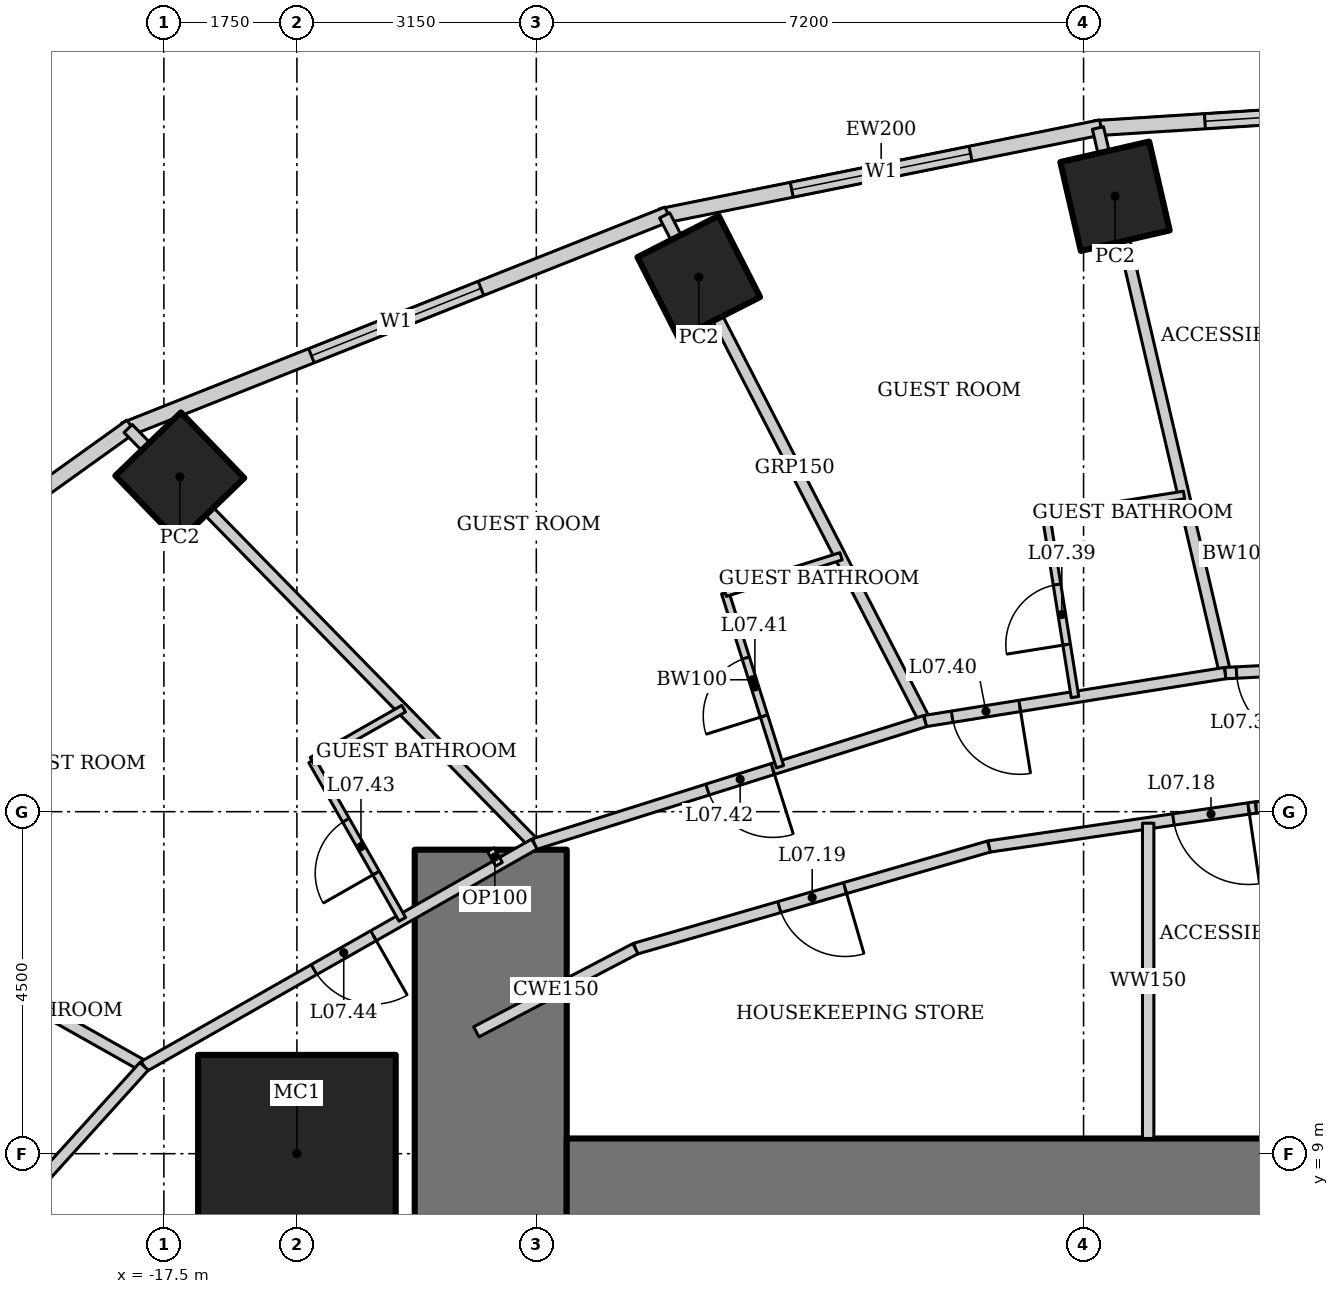
"""IFC4 building model, lengths in metres.
Left out: names, types, materials, properties, quantities, classifications, styles, units other than length and angle.
Written with IfcOpenShell. Run it as: python <this file> out.ifc"""

import sys

from ifc_helpers import new_model, si_unit, direction, frame, frame_2d, origin, origin_2d, place, context, subcontext, project, spatial, rectangle, hollow_rectangle, extrude, element, fill, save


model = new_model("IFC4")
c1 = context("Model", 3, precision=1e-05, world=origin(), true_north=direction((0.0, 1.0)))
c2 = subcontext(c1, "Body", "Model", "MODEL_VIEW")
j1 = project(units=[si_unit("LENGTHUNIT", "METRE"), si_unit("PLANEANGLEUNIT", "RADIAN")], contexts=[c1])
p1 = place(None, origin())
s1 = spatial("IfcSite", under=j1, at=p1, CompositionType="ELEMENT")
p2 = place(p1, origin())
s2 = spatial("IfcBuilding", under=s1, at=p2, CompositionType="ELEMENT")
p3 = place(p2, frame((0.0, 0.0, 40.6)))
s3 = spatial("IfcBuildingStorey", under=s2, at=p3, CompositionType="ELEMENT", Elevation=40.6)
p4 = place(p3, frame((-15.75, 9.0, 0.0), z_axis=(0.0, 0.0, 1.0), x_axis=(1.0, 0.0, 0.0)))
e1 = element("IfcColumn", 1, at=p4, inside=s3, PredefinedType="COLUMN", context=c2, shape_type="SweptSolid", body=[
    extrude(hollow_rectangle(XDim=2.6, YDim=2.6, WallThickness=0.13, at=origin_2d()), origin(), (0.0, 0.0, 1.0), 3.6),
])
for number, where, z_axis, x_axis in (
    (2, (-4.986, 21.598, 0.0), (0.0, 0.0, 1.0), (0.974, 0.225, 0.0)),
    (3, (-10.463, 20.534, 0.0), (0.0, 0.0, 1.0), (0.891, 0.454, 0.0)),
    (4, (-17.291, 17.905, 0.0), (0.0, 0.0, 1.0), (0.719, 0.695, 0.0)),
):
    element("IfcColumn", number, at=place(p3, frame(where, z_axis=z_axis, x_axis=x_axis)), inside=s3, PredefinedType="COLUMN", context=c2, shape_type="SweptSolid", body=[
        extrude(hollow_rectangle(XDim=1.2, YDim=1.2, WallThickness=0.1, at=origin_2d()), origin(), (0.0, 0.0, 1.0), 3.6),
    ])
p5 = place(p3, frame((-13.2, 13.0, 0.0), z_axis=(0.0, 0.0, 1.0), x_axis=(0.0, -1.0, 0.0)))
e5 = element("IfcWall", 5, at=p5, inside=s3, PredefinedType="SHEAR", context=c2, shape_type="SweptSolid", body=[
    extrude(rectangle(XDim=26.0, YDim=2.0, at=frame_2d((13.0, 0.0))), origin(), (0.0, 0.0, 1.0), 3.6),
])
p6 = place(p5, frame((12.1, 0.0, 0.0)))
e6 = element("IfcOpeningElement", 6, at=p6, cuts=e5, PredefinedType="OPENING", context=c2, shape_type="SweptSolid", body=[
    extrude(rectangle(XDim=1.8, YDim=2.1, at=frame_2d((0.9, 1.05))), frame((0.0, 1.01, 0.0), z_axis=(0.0, -1.0, 0.0), x_axis=(1.0, 0.0, 0.0)), (0.0, 0.0, 1.0), 2.02),
])
p7 = place(p3, frame((12.2, 8.0, 0.0), z_axis=(0.0, 0.0, 1.0), x_axis=(-1.0, 0.0, 0.0)))
e7 = element("IfcWall", 7, at=p7, inside=s3, PredefinedType="SHEAR", context=c2, shape_type="SweptSolid", body=[
    extrude(rectangle(XDim=24.4, YDim=2.4, at=frame_2d((12.2, 0.0))), origin(), (0.0, 0.0, 1.0), 3.6),
])
p8 = place(p3, frame((0.041, 22.827, 0.0), z_axis=(0.0, 0.0, 1.0), x_axis=(-0.998018582375, -0.062919863585, 0.0)))
e8 = element("IfcWall", 8, at=p8, inside=s3, PredefinedType="SOLIDWALL", context=c2, shape_type="SweptSolid", body=[
    extrude(rectangle(XDim=5.304, YDim=0.2, at=frame_2d((2.652, 0.0))), origin(), (0.0, 0.0, 1.0), 3.45),
])
p9 = place(p8, frame((1.452, 0.0, 0.5)))
e9 = element("IfcOpeningElement", 9, at=p9, cuts=e8, PredefinedType="OPENING", context=c2, shape_type="SweptSolid", body=[
    extrude(rectangle(XDim=2.4, YDim=2.2, at=frame_2d((1.2, 1.1))), frame((0.0, 0.11, 0.0), z_axis=(0.0, -1.0, 0.0), x_axis=(1.0, 0.0, 0.0)), (0.0, 0.0, 1.0), 0.22),
])
p10 = place(p3, frame((-5.17, 22.504, 0.0), z_axis=(0.0, 0.0, 1.0), x_axis=(-0.980251657452, -0.197754110105, 0.0)))
e10 = element("IfcWall", 10, at=p10, inside=s3, PredefinedType="SOLIDWALL", context=c2, shape_type="SweptSolid", body=[
    extrude(rectangle(XDim=5.904, YDim=0.2, at=frame_2d((2.952, 0.0))), origin(), (0.0, 0.0, 1.0), 3.45),
])
p11 = place(p10, frame((1.752, 0.0, 0.5)))
e11 = element("IfcOpeningElement", 11, at=p11, cuts=e10, PredefinedType="OPENING", context=c2, shape_type="SweptSolid", body=[
    extrude(rectangle(XDim=2.4, YDim=2.2, at=frame_2d((1.2, 1.1))), frame((0.0, 0.11, 0.0), z_axis=(0.0, -1.0, 0.0), x_axis=(1.0, 0.0, 0.0)), (0.0, 0.0, 1.0), 0.22),
])
p12 = place(p3, frame((-10.869, 21.363, 0.0), z_axis=(0.0, 0.0, 1.0), x_axis=(-0.929358351251, -0.369178892895, 0.0)))
e12 = element("IfcWall", 12, at=p12, inside=s3, PredefinedType="SOLIDWALL", context=c2, shape_type="SweptSolid", body=[
    extrude(rectangle(XDim=7.692, YDim=0.2, at=frame_2d((3.846, 0.0))), origin(), (0.0, 0.0, 1.0), 3.45),
])
p13 = place(p12, frame((2.646, 0.0, 0.5)))
e13 = element("IfcOpeningElement", 13, at=p13, cuts=e12, PredefinedType="OPENING", context=c2, shape_type="SweptSolid", body=[
    extrude(rectangle(XDim=2.4, YDim=2.2, at=frame_2d((1.2, 1.1))), frame((0.0, 0.11, 0.0), z_axis=(0.0, -1.0, 0.0), x_axis=(1.0, 0.0, 0.0)), (0.0, 0.0, 1.0), 0.22),
])
p14 = place(p3, frame((-17.929, 18.572, 0.0), z_axis=(0.0, 0.0, 1.0), x_axis=(-0.812791321576, -0.582554948112, 0.0)))
e14 = element("IfcWall", 14, at=p14, inside=s3, PredefinedType="SOLIDWALL", context=c2, shape_type="SweptSolid", body=[
    extrude(rectangle(XDim=8.063, YDim=0.2, at=frame_2d((4.032, 0.0))), origin(), (0.0, 0.0, 1.0), 3.45),
])
p15 = place(p14, frame((2.832, 0.0, 0.5)))
e15 = element("IfcOpeningElement", 15, at=p15, cuts=e14, PredefinedType="OPENING", context=c2, shape_type="SweptSolid", body=[
    extrude(rectangle(XDim=2.4, YDim=2.2, at=frame_2d((1.2, 1.1))), frame((0.0, 0.11, 0.0), z_axis=(0.0, -1.0, 0.0), x_axis=(1.0, 0.0, 0.0)), (0.0, 0.0, 1.0), 0.22),
])
p16 = place(p3, frame((-5.211, 22.496, 0.0), z_axis=(0.0, 0.0, 1.0), x_axis=(0.227195035564, -0.973849277771, 0.0)))
e16 = element("IfcWall", 16, at=p16, inside=s3, PredefinedType="PARTITIONING", context=c2, shape_type="SweptSolid", body=[
    extrude(rectangle(XDim=7.365, YDim=0.15, at=frame_2d((3.683, 0.0))), origin(), (0.0, 0.0, 1.0), 2.767),
])
p17 = place(p3, frame((-10.912, 21.346, 0.0), z_axis=(0.0, 0.0, 1.0), x_axis=(0.45777845119, -0.889066302154, 0.0)))
e17 = element("IfcWall", 17, at=p17, inside=s3, PredefinedType="PARTITIONING", context=c2, shape_type="SweptSolid", body=[
    extrude(rectangle(XDim=7.483, YDim=0.15, at=frame_2d((3.742, 0.0))), origin(), (0.0, 0.0, 1.0), 2.528),
])
p18 = place(p3, frame((-17.97, 18.542, 0.0), z_axis=(0.0, 0.0, 1.0), x_axis=(0.699032031211, -0.715090357467, 0.0)))
e18 = element("IfcWall", 18, at=p18, inside=s3, PredefinedType="PARTITIONING", context=c2, shape_type="SweptSolid", body=[
    extrude(rectangle(XDim=7.647, YDim=0.15, at=frame_2d((3.824, 0.0))), origin(), (0.0, 0.0, 1.0), 2.528),
])
p19 = place(p3, frame((-24.435, 13.909, 0.0), z_axis=(0.0, 0.0, 1.0), x_axis=(0.871267209855, -0.490808974074, 0.0)))
e19 = element("IfcWall", 19, at=p19, inside=s3, PredefinedType="PARTITIONING", context=c2, shape_type="SweptSolid", body=[
    extrude(rectangle(XDim=7.659, YDim=0.15, at=frame_2d((3.83, 0.0))), origin(), (0.0, 0.0, 1.0), 2.693),
])
p20 = place(p3, frame((0.0, 15.5, 0.0), z_axis=(0.0, 0.0, 1.0), x_axis=(-0.998754057167, -0.049903239295, 0.0)))
e20 = element("IfcWall", 20, at=p20, inside=s3, PredefinedType="PARTITIONING", context=c2, shape_type="SweptSolid", body=[
    extrude(rectangle(XDim=3.542, YDim=0.15, at=frame_2d((1.771, 0.0))), origin(), (0.0, 0.0, 1.0), 3.45),
])
p21 = place(p20, frame((2.392, 0.0, 0.0)))
e21 = element("IfcOpeningElement", 21, at=p21, cuts=e20, PredefinedType="OPENING", context=c2, shape_type="SweptSolid", body=[
    extrude(rectangle(XDim=1.0, YDim=2.1, at=frame_2d((0.5, 1.05))), frame((0.0, 0.085, 0.0), z_axis=(0.0, -1.0, 0.0), x_axis=(1.0, 0.0, 0.0)), (0.0, 0.0, 1.0), 0.17),
])
p22 = place(p3, frame((-3.538, 15.323, 0.0), z_axis=(0.0, 0.0, 1.0), x_axis=(-0.987475660646, -0.157771415761, 0.0)))
e22 = element("IfcWall", 22, at=p22, inside=s3, PredefinedType="PARTITIONING", context=c2, shape_type="SweptSolid", body=[
    extrude(rectangle(XDim=3.999, YDim=0.15, at=frame_2d((1.999, 0.0))), origin(), (0.0, 0.0, 1.0), 3.45),
])
p23 = place(p22, frame((2.736, 0.0, 0.0)))
e23 = element("IfcOpeningElement", 23, at=p23, cuts=e22, PredefinedType="OPENING", context=c2, shape_type="SweptSolid", body=[
    extrude(rectangle(XDim=0.9, YDim=2.1, at=frame_2d((0.45, 1.05))), frame((0.0, 0.085, 0.0), z_axis=(0.0, -1.0, 0.0), x_axis=(1.0, 0.0, 0.0)), (0.0, 0.0, 1.0), 0.17),
])
p24 = place(p3, frame((-7.486, 14.692, 0.0), z_axis=(0.0, 0.0, 1.0), x_axis=(-0.953774229808, -0.30052407317, 0.0)))
e24 = element("IfcWall", 24, at=p24, inside=s3, PredefinedType="PARTITIONING", context=c2, shape_type="SweptSolid", body=[
    extrude(rectangle(XDim=5.388, YDim=0.15, at=frame_2d((2.694, 0.0))), origin(), (0.0, 0.0, 1.0), 3.45),
])
p25 = place(p24, frame((2.1, 0.0, 0.0)))
e25 = element("IfcOpeningElement", 25, at=p25, cuts=e24, PredefinedType="OPENING", context=c2, shape_type="SweptSolid", body=[
    extrude(rectangle(XDim=0.9, YDim=2.1, at=frame_2d((0.45, 1.05))), frame((0.0, 0.085, 0.0), z_axis=(0.0, -1.0, 0.0), x_axis=(1.0, 0.0, 0.0)), (0.0, 0.0, 1.0), 0.17),
])
p26 = place(p3, frame((-12.625, 13.073, 0.0), z_axis=(0.0, 0.0, 1.0), x_axis=(-0.86907565943, -0.494679187136, 0.0)))
e26 = element("IfcWall", 26, at=p26, inside=s3, PredefinedType="PARTITIONING", context=c2, shape_type="SweptSolid", body=[
    extrude(rectangle(XDim=5.911, YDim=0.15, at=frame_2d((2.955, 0.0))), origin(), (0.0, 0.0, 1.0), 3.45),
])
p27 = place(p26, frame((2.437, 0.0, 0.0)))
e27 = element("IfcOpeningElement", 27, at=p27, cuts=e26, PredefinedType="OPENING", context=c2, shape_type="SweptSolid", body=[
    extrude(rectangle(XDim=0.9, YDim=2.1, at=frame_2d((0.45, 1.05))), frame((0.0, 0.085, 0.0), z_axis=(0.0, -1.0, 0.0), x_axis=(1.0, 0.0, 0.0)), (0.0, 0.0, 1.0), 0.17),
])
p28 = place(p3, frame((-17.761, 10.149, 0.0), z_axis=(0.0, 0.0, 1.0), x_axis=(-0.670598380282, -0.741820606591, 0.0)))
e28 = element("IfcWall", 28, at=p28, inside=s3, PredefinedType="PARTITIONING", context=c2, shape_type="SweptSolid", body=[
    extrude(rectangle(XDim=6.293, YDim=0.15, at=frame_2d((3.147, 0.0))), origin(), (0.0, 0.0, 1.0), 3.45),
])
p29 = place(p28, frame((5.244, 0.0, 0.0)))
e29 = element("IfcOpeningElement", 29, at=p29, cuts=e28, PredefinedType="OPENING", context=c2, shape_type="SweptSolid", body=[
    extrude(rectangle(XDim=0.9, YDim=2.1, at=frame_2d((0.45, 1.05))), frame((0.0, 0.085, 0.0), z_axis=(0.0, -1.0, 0.0), x_axis=(1.0, 0.0, 0.0)), (0.0, 0.0, 1.0), 0.17),
])
p30 = place(p3, frame((-3.13, 13.557, 0.0), z_axis=(0.0, 0.0, 1.0), x_axis=(-0.989443047021, -0.14492224364, 0.0)))
e30 = element("IfcWall", 30, at=p30, inside=s3, PredefinedType="PARTITIONING", context=c2, shape_type="SweptSolid", body=[
    extrude(rectangle(XDim=3.553, YDim=0.15, at=frame_2d((1.776, 0.0))), origin(), (0.0, 0.0, 1.0), 3.45),
])
p31 = place(p30, frame((0.1, 0.0, 0.0)))
e31 = element("IfcOpeningElement", 31, at=p31, cuts=e30, PredefinedType="OPENING", context=c2, shape_type="SweptSolid", body=[
    extrude(rectangle(XDim=1.0, YDim=2.1, at=frame_2d((0.5, 1.05))), frame((0.0, 0.085, 0.0), z_axis=(0.0, -1.0, 0.0), x_axis=(1.0, 0.0, 0.0)), (0.0, 0.0, 1.0), 0.17),
])
p32 = place(p3, frame((-6.645, 13.042, 0.0), z_axis=(0.0, 0.0, 1.0), x_axis=(-0.960678318068, -0.277663770041, 0.0)))
e32 = element("IfcWall", 32, at=p32, inside=s3, PredefinedType="PARTITIONING", context=c2, shape_type="SweptSolid", body=[
    extrude(rectangle(XDim=4.841, YDim=0.15, at=frame_2d((2.421, 0.0))), origin(), (0.0, 0.0, 1.0), 3.45),
])
p33 = place(p32, frame((1.971, 0.0, 0.0)))
e33 = element("IfcOpeningElement", 33, at=p33, cuts=e32, PredefinedType="OPENING", context=c2, shape_type="SweptSolid", body=[
    extrude(rectangle(XDim=0.9, YDim=2.1, at=frame_2d((0.45, 1.05))), frame((0.0, 0.085, 0.0), z_axis=(0.0, -1.0, 0.0), x_axis=(1.0, 0.0, 0.0)), (0.0, 0.0, 1.0), 0.17),
])
p34 = place(p3, frame((-4.55, 9.2, 0.0), z_axis=(0.0, 0.0, 1.0), x_axis=(0.0, 1.0, 0.0)))
e34 = element("IfcWall", 34, at=p34, inside=s3, PredefinedType="SOLIDWALL", context=c2, shape_type="SweptSolid", body=[
    extrude(rectangle(XDim=4.149, YDim=0.15, at=frame_2d((2.074, 0.0))), origin(), (0.0, 0.0, 1.0), 3.45),
])
p35 = place(p3, frame((-5.513, 15.008, 0.0), z_axis=(0.0, 0.0, 1.0), x_axis=(-0.157780217218, 0.987474254376, 0.0)))
e35 = element("IfcWall", 35, at=p35, inside=s3, PredefinedType="PARTITIONING", context=c2, shape_type="SweptSolid", body=[
    extrude(rectangle(XDim=2.4, YDim=0.1, at=frame_2d((1.2, 0.0))), origin(), (0.0, 0.0, 1.0), 3.45),
])
p36 = place(p35, frame((0.7, 0.0, 0.0)))
e36 = element("IfcOpeningElement", 36, at=p36, cuts=e35, PredefinedType="OPENING", context=c2, shape_type="SweptSolid", body=[
    extrude(rectangle(XDim=0.8, YDim=2.1, at=frame_2d((0.4, 1.05))), frame((0.0, 0.06, 0.0), z_axis=(0.0, -1.0, 0.0), x_axis=(1.0, 0.0, 0.0)), (0.0, 0.0, 1.0), 0.12),
])
p37 = place(p3, frame((-5.891, 17.378, 0.0), z_axis=(0.0, 0.0, 1.0), x_axis=(0.987478784284, 0.157751863976, 0.0)))
e37 = element("IfcWall", 37, at=p37, inside=s3, PredefinedType="PARTITIONING", context=c2, shape_type="SweptSolid", body=[
    extrude(rectangle(XDim=1.835, YDim=0.1, at=frame_2d((0.918, 0.0))), origin(), (0.0, 0.0, 1.0), 3.45),
])
p38 = place(p3, frame((-9.394, 14.091, 0.0), z_axis=(0.0, 0.0, 1.0), x_axis=(-0.30049839721, 0.953782319649, 0.0)))
e38 = element("IfcWall", 38, at=p38, inside=s3, PredefinedType="PARTITIONING", context=c2, shape_type="SweptSolid", body=[
    extrude(rectangle(XDim=2.4, YDim=0.1, at=frame_2d((1.2, 0.0))), origin(), (0.0, 0.0, 1.0), 3.45),
])
p39 = place(p38, frame((0.7, 0.0, 0.0)))
e39 = element("IfcOpeningElement", 39, at=p39, cuts=e38, PredefinedType="OPENING", context=c2, shape_type="SweptSolid", body=[
    extrude(rectangle(XDim=0.8, YDim=2.1, at=frame_2d((0.4, 1.05))), frame((0.0, 0.06, 0.0), z_axis=(0.0, -1.0, 0.0), x_axis=(1.0, 0.0, 0.0)), (0.0, 0.0, 1.0), 0.12),
])
p40 = place(p3, frame((-10.115, 16.38, 0.0), z_axis=(0.0, 0.0, 1.0), x_axis=(0.953764923986, 0.300553605492, 0.0)))
e40 = element("IfcWall", 40, at=p40, inside=s3, PredefinedType="PARTITIONING", context=c2, shape_type="SweptSolid", body=[
    extrude(rectangle(XDim=1.598, YDim=0.1, at=frame_2d((0.799, 0.0))), origin(), (0.0, 0.0, 1.0), 3.45),
])
p41 = place(p3, frame((-14.363, 12.084, 0.0), z_axis=(0.0, 0.0, 1.0), x_axis=(-0.494703113698, 0.869062039959, 0.0)))
e41 = element("IfcWall", 41, at=p41, inside=s3, PredefinedType="PARTITIONING", context=c2, shape_type="SweptSolid", body=[
    extrude(rectangle(XDim=2.4, YDim=0.1, at=frame_2d((1.2, 0.0))), origin(), (0.0, 0.0, 1.0), 3.45),
])
p42 = place(p41, frame((0.7, 0.0, 0.0)))
e42 = element("IfcOpeningElement", 42, at=p42, cuts=e41, PredefinedType="OPENING", context=c2, shape_type="SweptSolid", body=[
    extrude(rectangle(XDim=0.8, YDim=2.1, at=frame_2d((0.4, 1.05))), frame((0.0, 0.06, 0.0), z_axis=(0.0, -1.0, 0.0), x_axis=(1.0, 0.0, 0.0)), (0.0, 0.0, 1.0), 0.12),
])
p43 = place(p3, frame((-15.55, 14.17, 0.0), z_axis=(0.0, 0.0, 1.0), x_axis=(0.869065896633, 0.494696338485, 0.0)))
e43 = element("IfcWall", 43, at=p43, inside=s3, PredefinedType="PARTITIONING", context=c2, shape_type="SweptSolid", body=[
    extrude(rectangle(XDim=1.386, YDim=0.1, at=frame_2d((0.693, 0.0))), origin(), (0.0, 0.0, 1.0), 3.45),
])
p44 = place(p3, frame((-13.2, 13.0, 0.0), z_axis=(0.0, 0.0, 1.0), x_axis=(0.49435138335, -0.869262164011, 0.0)))
e44 = element("IfcWall", 44, at=p44, inside=s3, PredefinedType="PARTITIONING", context=c2, shape_type="SweptSolid", body=[
    extrude(rectangle(XDim=0.221, YDim=0.1, at=frame_2d((0.11, 0.0))), origin(), (0.0, 0.0, 1.0), 3.45),
])
p45 = place(p3, frame((-11.296, 11.698, 0.0), z_axis=(0.0, 0.0, 1.0), x_axis=(-0.886306431218, -0.463099244203, 0.0)))
e45 = element("IfcWall", 45, at=p45, inside=s3, PredefinedType="PARTITIONING", context=c2, shape_type="SweptSolid", body=[
    extrude(rectangle(XDim=2.362, YDim=0.15, at=frame_2d((1.181, 0.0))), origin(), (0.0, 0.0, 1.0), 3.45),
])
p46 = place(p3, frame((-2.035, 13.607, 0.0), z_axis=(0.0, 0.0, 1.0), x_axis=(-0.998946843147, -0.045882508292, 0.0)))
e46 = element("IfcWall", 46, at=p46, inside=s3, PredefinedType="PARTITIONING", context=c2, shape_type="SweptSolid", body=[
    extrude(rectangle(XDim=1.096, YDim=0.15, at=frame_2d((0.548, 0.0))), origin(), (0.0, 0.0, 1.0), 3.45),
])
p47 = place(p9, origin())
e47 = element("IfcWindow", 47, at=p47, inside=s3, PartitioningType="SINGLE_PANEL", PredefinedType="WINDOW", context=c2, shape_type="SweptSolid", body=[
    extrude(rectangle(XDim=2.4, YDim=2.2, at=frame_2d((1.2, 1.1))), frame((0.0, 0.03, 0.0), z_axis=(0.0, -1.0, 0.0), x_axis=(1.0, 0.0, 0.0)), (0.0, 0.0, 1.0), 0.06),
])
fill(e9, e47)
p48 = place(p11, origin())
e48 = element("IfcWindow", 48, at=p48, inside=s3, PartitioningType="SINGLE_PANEL", PredefinedType="WINDOW", context=c2, shape_type="SweptSolid", body=[
    extrude(rectangle(XDim=2.4, YDim=2.2, at=frame_2d((1.2, 1.1))), frame((0.0, 0.03, 0.0), z_axis=(0.0, -1.0, 0.0), x_axis=(1.0, 0.0, 0.0)), (0.0, 0.0, 1.0), 0.06),
])
fill(e11, e48)
p49 = place(p13, origin())
e49 = element("IfcWindow", 49, at=p49, inside=s3, PartitioningType="SINGLE_PANEL", PredefinedType="WINDOW", context=c2, shape_type="SweptSolid", body=[
    extrude(rectangle(XDim=2.4, YDim=2.2, at=frame_2d((1.2, 1.1))), frame((0.0, 0.03, 0.0), z_axis=(0.0, -1.0, 0.0), x_axis=(1.0, 0.0, 0.0)), (0.0, 0.0, 1.0), 0.06),
])
fill(e13, e49)
p50 = place(p31, origin())
e50 = element("IfcDoor", 50, at=p50, inside=s3, OperationType="SINGLE_SWING_LEFT", PredefinedType="DOOR", context=c2, shape_type="SweptSolid", body=[
    extrude(rectangle(XDim=1.0, YDim=2.1, at=frame_2d((0.5, 1.05))), frame((0.0, 0.025, 0.0), z_axis=(0.0, -1.0, 0.0), x_axis=(1.0, 0.0, 0.0)), (0.0, 0.0, 1.0), 0.05),
])
fill(e31, e50)
p51 = place(p33, origin())
e51 = element("IfcDoor", 51, at=p51, inside=s3, OperationType="SINGLE_SWING_LEFT", PredefinedType="DOOR", context=c2, shape_type="SweptSolid", body=[
    extrude(rectangle(XDim=0.9, YDim=2.1, at=frame_2d((0.45, 1.05))), frame((0.0, 0.025, 0.0), z_axis=(0.0, -1.0, 0.0), x_axis=(1.0, 0.0, 0.0)), (0.0, 0.0, 1.0), 0.05),
])
fill(e33, e51)
p52 = place(p21, origin())
e52 = element("IfcDoor", 52, at=p52, inside=s3, OperationType="SINGLE_SWING_LEFT", PredefinedType="DOOR", context=c2, shape_type="SweptSolid", body=[
    extrude(rectangle(XDim=1.0, YDim=2.1, at=frame_2d((0.5, 1.05))), frame((0.0, 0.025, 0.0), z_axis=(0.0, -1.0, 0.0), x_axis=(1.0, 0.0, 0.0)), (0.0, 0.0, 1.0), 0.05),
])
fill(e21, e52)
p53 = place(p36, origin())
e53 = element("IfcDoor", 53, at=p53, inside=s3, OperationType="SINGLE_SWING_LEFT", PredefinedType="DOOR", context=c2, shape_type="SweptSolid", body=[
    extrude(rectangle(XDim=0.8, YDim=2.1, at=frame_2d((0.4, 1.05))), frame((0.0, 0.025, 0.0), z_axis=(0.0, -1.0, 0.0), x_axis=(1.0, 0.0, 0.0)), (0.0, 0.0, 1.0), 0.05),
])
fill(e36, e53)
p54 = place(p23, origin())
e54 = element("IfcDoor", 54, at=p54, inside=s3, OperationType="SINGLE_SWING_LEFT", PredefinedType="DOOR", context=c2, shape_type="SweptSolid", body=[
    extrude(rectangle(XDim=0.9, YDim=2.1, at=frame_2d((0.45, 1.05))), frame((0.0, 0.025, 0.0), z_axis=(0.0, -1.0, 0.0), x_axis=(1.0, 0.0, 0.0)), (0.0, 0.0, 1.0), 0.05),
])
fill(e23, e54)
p55 = place(p39, origin())
e55 = element("IfcDoor", 55, at=p55, inside=s3, OperationType="SINGLE_SWING_LEFT", PredefinedType="DOOR", context=c2, shape_type="SweptSolid", body=[
    extrude(rectangle(XDim=0.8, YDim=2.1, at=frame_2d((0.4, 1.05))), frame((0.0, 0.025, 0.0), z_axis=(0.0, -1.0, 0.0), x_axis=(1.0, 0.0, 0.0)), (0.0, 0.0, 1.0), 0.05),
])
fill(e39, e55)
p56 = place(p25, origin())
e56 = element("IfcDoor", 56, at=p56, inside=s3, OperationType="SINGLE_SWING_LEFT", PredefinedType="DOOR", context=c2, shape_type="SweptSolid", body=[
    extrude(rectangle(XDim=0.9, YDim=2.1, at=frame_2d((0.45, 1.05))), frame((0.0, 0.025, 0.0), z_axis=(0.0, -1.0, 0.0), x_axis=(1.0, 0.0, 0.0)), (0.0, 0.0, 1.0), 0.05),
])
fill(e25, e56)
p57 = place(p42, origin())
e57 = element("IfcDoor", 57, at=p57, inside=s3, OperationType="SINGLE_SWING_LEFT", PredefinedType="DOOR", context=c2, shape_type="SweptSolid", body=[
    extrude(rectangle(XDim=0.8, YDim=2.1, at=frame_2d((0.4, 1.05))), frame((0.0, 0.025, 0.0), z_axis=(0.0, -1.0, 0.0), x_axis=(1.0, 0.0, 0.0)), (0.0, 0.0, 1.0), 0.05),
])
fill(e42, e57)
p58 = place(p27, origin())
e58 = element("IfcDoor", 58, at=p58, inside=s3, OperationType="SINGLE_SWING_LEFT", PredefinedType="DOOR", context=c2, shape_type="SweptSolid", body=[
    extrude(rectangle(XDim=0.9, YDim=2.1, at=frame_2d((0.45, 1.05))), frame((0.0, 0.025, 0.0), z_axis=(0.0, -1.0, 0.0), x_axis=(1.0, 0.0, 0.0)), (0.0, 0.0, 1.0), 0.05),
])
fill(e27, e58)
save(model, sys.argv[1])
